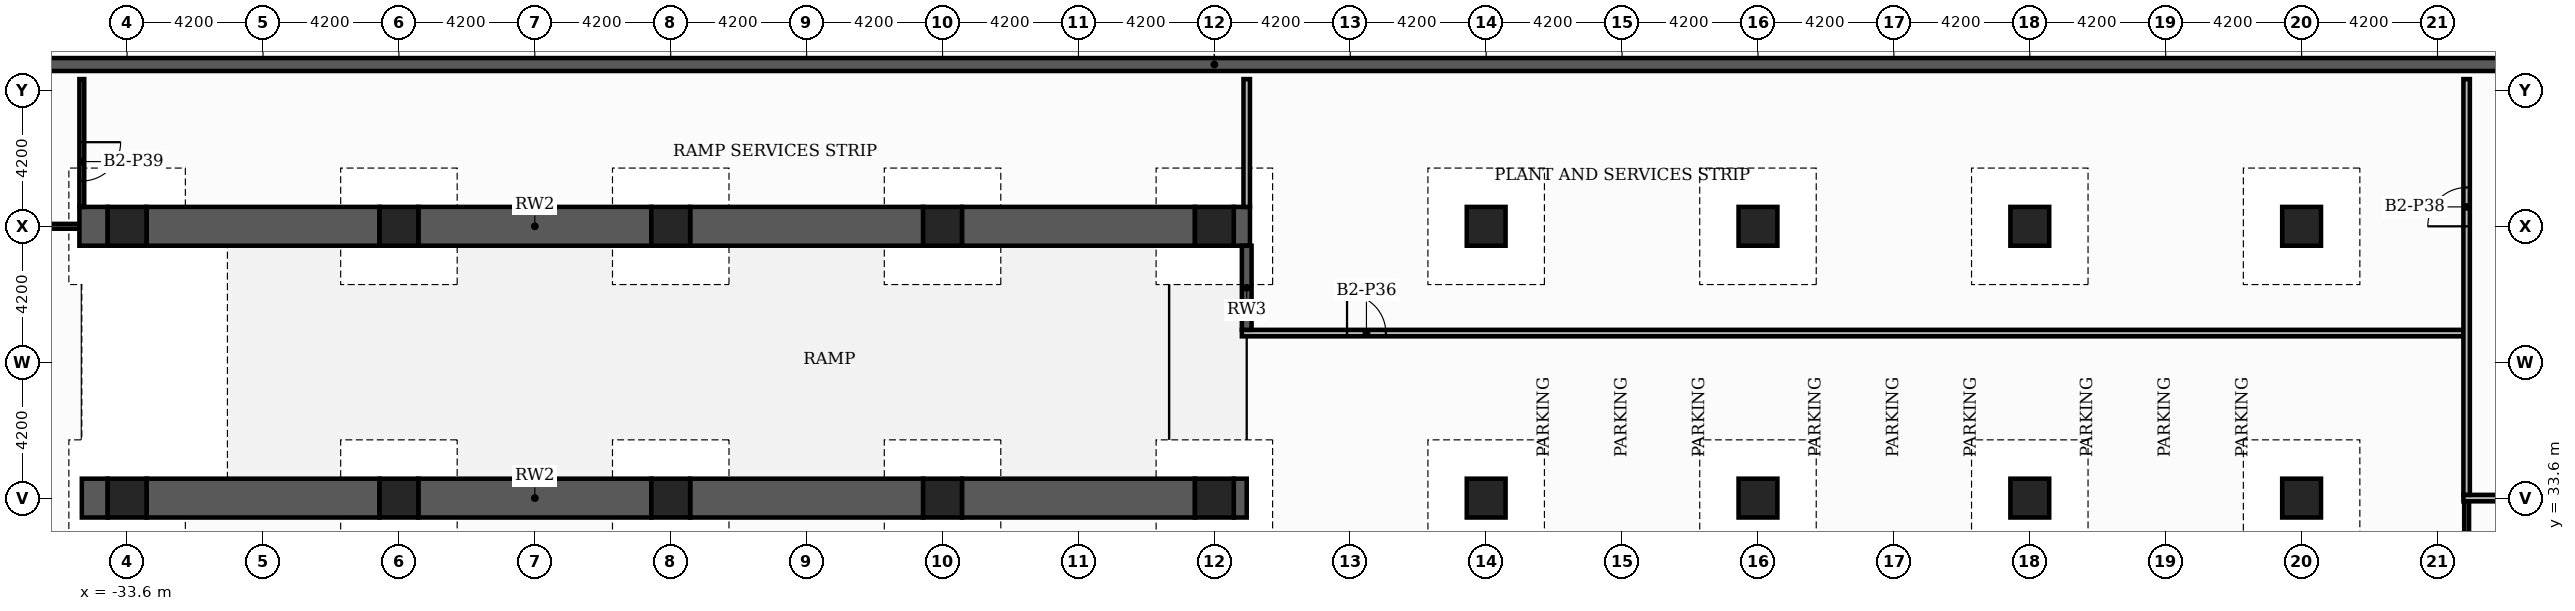
"""IFC4 building model, lengths in metres.
Left out: names, types, materials, properties, quantities, classifications, styles, units other than length and angle.
Written with IfcOpenShell. Run it as: python <this file> out.ifc"""

import sys

from ifc_helpers import new_model, si_unit, direction, frame, frame_2d, origin, origin_2d, place, context, subcontext, project, spatial, rectangle, extrude, element, fill, save


model = new_model("IFC4")
c1 = context("Model", 3, precision=1e-05, world=origin(), true_north=direction((0.0, 1.0)))
c2 = subcontext(c1, "Body", "Model", "MODEL_VIEW")
j1 = project(units=[si_unit("LENGTHUNIT", "METRE"), si_unit("PLANEANGLEUNIT", "RADIAN")], contexts=[c1])
p1 = place(None, origin())
s1 = spatial("IfcSite", under=j1, at=p1, CompositionType="ELEMENT")
p2 = place(p1, origin())
s2 = spatial("IfcBuilding", under=s1, at=p2, CompositionType="ELEMENT")
p3 = place(p2, frame((0.0, 0.0, -8.4)))
s3 = spatial("IfcBuildingStorey", under=s2, at=p3, CompositionType="ELEMENT", Elevation=-8.4)
p4 = place(p3, frame((-47.2, 47.0, -0.4), z_axis=(0.0, 0.0, 1.0), x_axis=(1.0, 0.0, 0.0)))
e1 = element("IfcWall", 1, at=p4, inside=s3, PredefinedType="USERDEFINED", context=c2, shape_type="SweptSolid", body=[
    extrude(rectangle(XDim=94.4, YDim=0.4, at=frame_2d((47.2, 0.0))), origin(), (0.0, 0.0, 1.0), 4.6),
])
for number, where, z_axis, x_axis in (
    (2, (0.0, 33.6, 0.0), (0.0, 0.0, 1.0), (1.0, 0.0, 0.0)),
    (3, (0.0, 42.0, 0.0), (0.0, 0.0, 1.0), (1.0, 0.0, 0.0)),
    (4, (8.4, 33.6, 0.0), (0.0, 0.0, 1.0), (1.0, 0.0, 0.0)),
    (5, (8.4, 42.0, 0.0), (0.0, 0.0, 1.0), (1.0, 0.0, 0.0)),
    (6, (16.8, 33.6, 0.0), (0.0, 0.0, 1.0), (1.0, 0.0, 0.0)),
    (7, (16.8, 42.0, 0.0), (0.0, 0.0, 1.0), (1.0, 0.0, 0.0)),
    (8, (25.2, 33.6, 0.0), (0.0, 0.0, 1.0), (1.0, 0.0, 0.0)),
    (9, (25.2, 42.0, 0.0), (0.0, 0.0, 1.0), (1.0, 0.0, 0.0)),
    (10, (33.6, 33.6, 0.0), (0.0, 0.0, 1.0), (1.0, 0.0, 0.0)),
    (11, (33.6, 42.0, 0.0), (0.0, 0.0, 1.0), (1.0, 0.0, 0.0)),
    (12, (-8.4, 33.6, 0.0), (0.0, 0.0, 1.0), (1.0, 0.0, 0.0)),
    (13, (-8.4, 42.0, 0.0), (0.0, 0.0, 1.0), (1.0, 0.0, 0.0)),
    (14, (-16.8, 33.6, 0.0), (0.0, 0.0, 1.0), (1.0, 0.0, 0.0)),
    (15, (-16.8, 42.0, 0.0), (0.0, 0.0, 1.0), (1.0, 0.0, 0.0)),
    (16, (-25.2, 33.6, 0.0), (0.0, 0.0, 1.0), (1.0, 0.0, 0.0)),
    (17, (-25.2, 42.0, 0.0), (0.0, 0.0, 1.0), (1.0, 0.0, 0.0)),
    (18, (-33.6, 33.6, 0.0), (0.0, 0.0, 1.0), (1.0, 0.0, 0.0)),
    (19, (-33.6, 42.0, 0.0), (0.0, 0.0, 1.0), (1.0, 0.0, 0.0)),
):
    element("IfcColumn", number, at=place(p3, frame(where, z_axis=z_axis, x_axis=x_axis)), inside=s3, PredefinedType="COLUMN", context=c2, shape_type="SweptSolid", body=[
        extrude(rectangle(XDim=1.2, YDim=1.2, at=origin_2d()), origin(), (0.0, 0.0, 1.0), 4.2),
    ])
p5 = place(p3, frame((-35.0, 33.6, 0.0), z_axis=(0.0, 0.0, 1.0), x_axis=(1.0, 0.0, 0.0)))
e20 = element("IfcWall", 20, at=p5, inside=s3, PredefinedType="SOLIDWALL", context=c2, shape_type="SweptSolid", body=[
    extrude(rectangle(XDim=0.8, YDim=1.2, at=frame_2d((0.4, 0.0))), origin(), (0.0, 0.0, 1.0), 3.85),
])
p6 = place(p3, frame((-33.0, 33.6, 0.0), z_axis=(0.0, 0.0, 1.0), x_axis=(1.0, 0.0, 0.0)))
e21 = element("IfcWall", 21, at=p6, inside=s3, PredefinedType="SOLIDWALL", context=c2, shape_type="SweptSolid", body=[
    extrude(rectangle(XDim=7.2, YDim=1.2, at=frame_2d((3.6, 0.0))), origin(), (0.0, 0.0, 1.0), 3.85),
])
p7 = place(p3, frame((-24.6, 33.6, 0.0), z_axis=(0.0, 0.0, 1.0), x_axis=(1.0, 0.0, 0.0)))
e22 = element("IfcWall", 22, at=p7, inside=s3, PredefinedType="SOLIDWALL", context=c2, shape_type="SweptSolid", body=[
    extrude(rectangle(XDim=7.2, YDim=1.2, at=frame_2d((3.6, 0.0))), origin(), (0.0, 0.0, 1.0), 3.85),
])
for number, where, z_axis, x_axis in (
    (23, (-16.2, 33.6, 0.0), (0.0, 0.0, 1.0), (1.0, 0.0, 0.0)),
    (24, (-7.8, 33.6, 0.0), (0.0, 0.0, 1.0), (1.0, 0.0, 0.0)),
):
    element("IfcWall", number, at=place(p3, frame(where, z_axis=z_axis, x_axis=x_axis)), inside=s3, PredefinedType="SOLIDWALL", context=c2, shape_type="SweptSolid", body=[
        extrude(rectangle(XDim=7.2, YDim=1.2, at=frame_2d((3.6, 0.0))), origin(), (0.0, 0.0, 1.0), 3.85),
    ])
p8 = place(p3, frame((0.6, 33.6, 0.0), z_axis=(0.0, 0.0, 1.0), x_axis=(1.0, 0.0, 0.0)))
e25 = element("IfcWall", 25, at=p8, inside=s3, PredefinedType="SOLIDWALL", context=c2, shape_type="SweptSolid", body=[
    extrude(rectangle(XDim=0.4, YDim=1.2, at=frame_2d((0.2, 0.0))), origin(), (0.0, 0.0, 1.0), 3.85),
])
p9 = place(p3, frame((38.6, 33.6, 0.0), z_axis=(0.0, 0.0, 1.0), x_axis=(1.0, 0.0, 0.0)))
e26 = element("IfcWall", 26, at=p9, inside=s3, PredefinedType="PARTITIONING", context=c2, shape_type="SweptSolid", body=[
    extrude(rectangle(XDim=2.8, YDim=0.2, at=frame_2d((1.4, 0.0))), origin(), (0.0, 0.0, 1.0), 3.85),
])
p10 = place(p3, frame((0.85, 38.7, 0.0), z_axis=(0.0, 0.0, 1.0), x_axis=(1.0, 0.0, 0.0)))
e27 = element("IfcWall", 27, at=p10, inside=s3, PredefinedType="PARTITIONING", context=c2, shape_type="SweptSolid", body=[
    extrude(rectangle(XDim=37.75, YDim=0.2, at=frame_2d((18.875, 0.0))), origin(), (0.0, 0.0, 1.0), 3.85),
])
p11 = place(p10, frame((3.25, 0.0, 0.0)))
e28 = element("IfcOpeningElement", 28, at=p11, cuts=e27, PredefinedType="OPENING", context=c2, shape_type="SweptSolid", body=[
    extrude(rectangle(XDim=1.2, YDim=2.2, at=frame_2d((0.6, 1.1))), frame((0.0, 0.11, 0.0), z_axis=(0.0, -1.0, 0.0), x_axis=(1.0, 0.0, 0.0)), (0.0, 0.0, 1.0), 0.22),
])
p12 = place(p3, frame((-41.4, 42.0, 0.0), z_axis=(0.0, 0.0, 1.0), x_axis=(1.0, 0.0, 0.0)))
e29 = element("IfcWall", 29, at=p12, inside=s3, PredefinedType="PARTITIONING", context=c2, shape_type="SweptSolid", body=[
    extrude(rectangle(XDim=6.325, YDim=0.15, at=frame_2d((3.163, 0.0))), origin(), (0.0, 0.0, 1.0), 3.85),
])
p13 = place(p12, frame((2.3, 0.0, 0.0)))
e30 = element("IfcOpeningElement", 30, at=p13, cuts=e29, PredefinedType="OPENING", context=c2, shape_type="SweptSolid", body=[
    extrude(rectangle(XDim=1.2, YDim=2.2, at=frame_2d((0.6, 1.1))), frame((0.0, 0.085, 0.0), z_axis=(0.0, -1.0, 0.0), x_axis=(1.0, 0.0, 0.0)), (0.0, 0.0, 1.0), 0.17),
])
p14 = place(p3, frame((-35.075, 42.0, 0.0), z_axis=(0.0, 0.0, 1.0), x_axis=(1.0, 0.0, 0.0)))
e31 = element("IfcWall", 31, at=p14, inside=s3, PredefinedType="SOLIDWALL", context=c2, shape_type="SweptSolid", body=[
    extrude(rectangle(XDim=0.875, YDim=1.2, at=frame_2d((0.438, 0.0))), origin(), (0.0, 0.0, 1.0), 3.85),
])
p15 = place(p3, frame((-33.0, 42.0, 0.0), z_axis=(0.0, 0.0, 1.0), x_axis=(1.0, 0.0, 0.0)))
e32 = element("IfcWall", 32, at=p15, inside=s3, PredefinedType="SOLIDWALL", context=c2, shape_type="SweptSolid", body=[
    extrude(rectangle(XDim=7.2, YDim=1.2, at=frame_2d((3.6, 0.0))), origin(), (0.0, 0.0, 1.0), 3.85),
])
p16 = place(p3, frame((-24.6, 42.0, 0.0), z_axis=(0.0, 0.0, 1.0), x_axis=(1.0, 0.0, 0.0)))
e33 = element("IfcWall", 33, at=p16, inside=s3, PredefinedType="SOLIDWALL", context=c2, shape_type="SweptSolid", body=[
    extrude(rectangle(XDim=7.2, YDim=1.2, at=frame_2d((3.6, 0.0))), origin(), (0.0, 0.0, 1.0), 3.85),
])
for number, where, z_axis, x_axis in (
    (34, (-16.2, 42.0, 0.0), (0.0, 0.0, 1.0), (1.0, 0.0, 0.0)),
    (35, (-7.8, 42.0, 0.0), (0.0, 0.0, 1.0), (1.0, 0.0, 0.0)),
):
    element("IfcWall", number, at=place(p3, frame(where, z_axis=z_axis, x_axis=x_axis)), inside=s3, PredefinedType="SOLIDWALL", context=c2, shape_type="SweptSolid", body=[
        extrude(rectangle(XDim=7.2, YDim=1.2, at=frame_2d((3.6, 0.0))), origin(), (0.0, 0.0, 1.0), 3.85),
    ])
p17 = place(p3, frame((0.6, 42.0, 0.0), z_axis=(0.0, 0.0, 1.0), x_axis=(1.0, 0.0, 0.0)))
e36 = element("IfcWall", 36, at=p17, inside=s3, PredefinedType="SOLIDWALL", context=c2, shape_type="SweptSolid", body=[
    extrude(rectangle(XDim=0.5, YDim=1.2, at=frame_2d((0.25, 0.0))), origin(), (0.0, 0.0, 1.0), 3.85),
])
p18 = place(p3, frame((-35.0, 42.6, 0.0), z_axis=(0.0, 0.0, 1.0), x_axis=(0.0, 1.0, 0.0)))
e37 = element("IfcWall", 37, at=p18, inside=s3, PredefinedType="PARTITIONING", context=c2, shape_type="SweptSolid", body=[
    extrude(rectangle(XDim=3.95, YDim=0.15, at=frame_2d((1.975, 0.0))), origin(), (0.0, 0.0, 1.0), 3.85),
])
p19 = place(p18, frame((0.8, 0.0, 0.0)))
e38 = element("IfcOpeningElement", 38, at=p19, cuts=e37, PredefinedType="OPENING", context=c2, shape_type="SweptSolid", body=[
    extrude(rectangle(XDim=1.2, YDim=2.2, at=frame_2d((0.6, 1.1))), frame((0.0, 0.085, 0.0), z_axis=(0.0, -1.0, 0.0), x_axis=(1.0, 0.0, 0.0)), (0.0, 0.0, 1.0), 0.17),
])
p20 = place(p3, frame((1.0, 38.8, 0.0), z_axis=(0.0, 0.0, 1.0), x_axis=(0.0, 1.0, 0.0)))
e39 = element("IfcWall", 39, at=p20, inside=s3, PredefinedType="SOLIDWALL", context=c2, shape_type="SweptSolid", body=[
    extrude(rectangle(XDim=2.6, YDim=0.3, at=frame_2d((1.3, 0.0))), origin(), (0.0, 0.0, 1.0), 3.85),
])
p21 = place(p3, frame((1.0, 42.6, 0.0), z_axis=(0.0, 0.0, 1.0), x_axis=(0.0, 1.0, 0.0)))
e40 = element("IfcWall", 40, at=p21, inside=s3, PredefinedType="PARTITIONING", context=c2, shape_type="SweptSolid", body=[
    extrude(rectangle(XDim=3.95, YDim=0.2, at=frame_2d((1.975, 0.0))), origin(), (0.0, 0.0, 1.0), 3.85),
])
p22 = place(p3, frame((38.7, 16.9, 0.0), z_axis=(0.0, 0.0, 1.0), x_axis=(0.0, 1.0, 0.0)))
e41 = element("IfcWall", 41, at=p22, inside=s3, PredefinedType="PARTITIONING", context=c2, shape_type="SweptSolid", body=[
    extrude(rectangle(XDim=16.6, YDim=0.15, at=frame_2d((8.3, 0.0))), origin(), (0.0, 0.0, 1.0), 3.85),
])
p23 = place(p22, frame((11.9, 0.0, 0.0)))
e42 = element("IfcOpeningElement", 42, at=p23, cuts=e41, PredefinedType="OPENING", context=c2, shape_type="SweptSolid", body=[
    extrude(rectangle(XDim=1.2, YDim=2.2, at=frame_2d((0.6, 1.1))), frame((0.0, 0.085, 0.0), z_axis=(0.0, -1.0, 0.0), x_axis=(1.0, 0.0, 0.0)), (0.0, 0.0, 1.0), 0.17),
])
p24 = place(p3, frame((38.7, 33.7, 0.0), z_axis=(0.0, 0.0, 1.0), x_axis=(0.0, 1.0, 0.0)))
e43 = element("IfcWall", 43, at=p24, inside=s3, PredefinedType="PARTITIONING", context=c2, shape_type="SweptSolid", body=[
    extrude(rectangle(XDim=12.85, YDim=0.2, at=frame_2d((6.425, 0.0))), origin(), (0.0, 0.0, 1.0), 3.85),
])
p25 = place(p24, frame((8.3, 0.0, 0.0)))
e44 = element("IfcOpeningElement", 44, at=p25, cuts=e43, PredefinedType="OPENING", context=c2, shape_type="SweptSolid", body=[
    extrude(rectangle(XDim=1.2, YDim=2.2, at=frame_2d((0.6, 1.1))), frame((0.0, 0.11, 0.0), z_axis=(0.0, -1.0, 0.0), x_axis=(1.0, 0.0, 0.0)), (0.0, 0.0, 1.0), 0.22),
])
p26 = place(p11, origin())
e45 = element("IfcDoor", 45, at=p26, inside=s3, OperationType="SINGLE_SWING_LEFT", PredefinedType="DOOR", context=c2, shape_type="SweptSolid", body=[
    extrude(rectangle(XDim=1.2, YDim=2.2, at=frame_2d((0.6, 1.1))), frame((0.0, 0.025, 0.0), z_axis=(0.0, -1.0, 0.0), x_axis=(1.0, 0.0, 0.0)), (0.0, 0.0, 1.0), 0.05),
])
fill(e28, e45)
p27 = place(p25, origin())
e46 = element("IfcDoor", 46, at=p27, inside=s3, OperationType="SINGLE_SWING_LEFT", PredefinedType="DOOR", context=c2, shape_type="SweptSolid", body=[
    extrude(rectangle(XDim=1.2, YDim=2.2, at=frame_2d((0.6, 1.1))), frame((0.0, 0.025, 0.0), z_axis=(0.0, -1.0, 0.0), x_axis=(1.0, 0.0, 0.0)), (0.0, 0.0, 1.0), 0.05),
])
fill(e44, e46)
p28 = place(p19, origin())
e47 = element("IfcDoor", 47, at=p28, inside=s3, OperationType="SINGLE_SWING_RIGHT", PredefinedType="DOOR", context=c2, shape_type="SweptSolid", body=[
    extrude(rectangle(XDim=1.2, YDim=2.2, at=frame_2d((0.6, 1.1))), frame((0.0, 0.025, 0.0), z_axis=(0.0, -1.0, 0.0), x_axis=(1.0, 0.0, 0.0)), (0.0, 0.0, 1.0), 0.05),
])
fill(e38, e47)
save(model, sys.argv[1])
